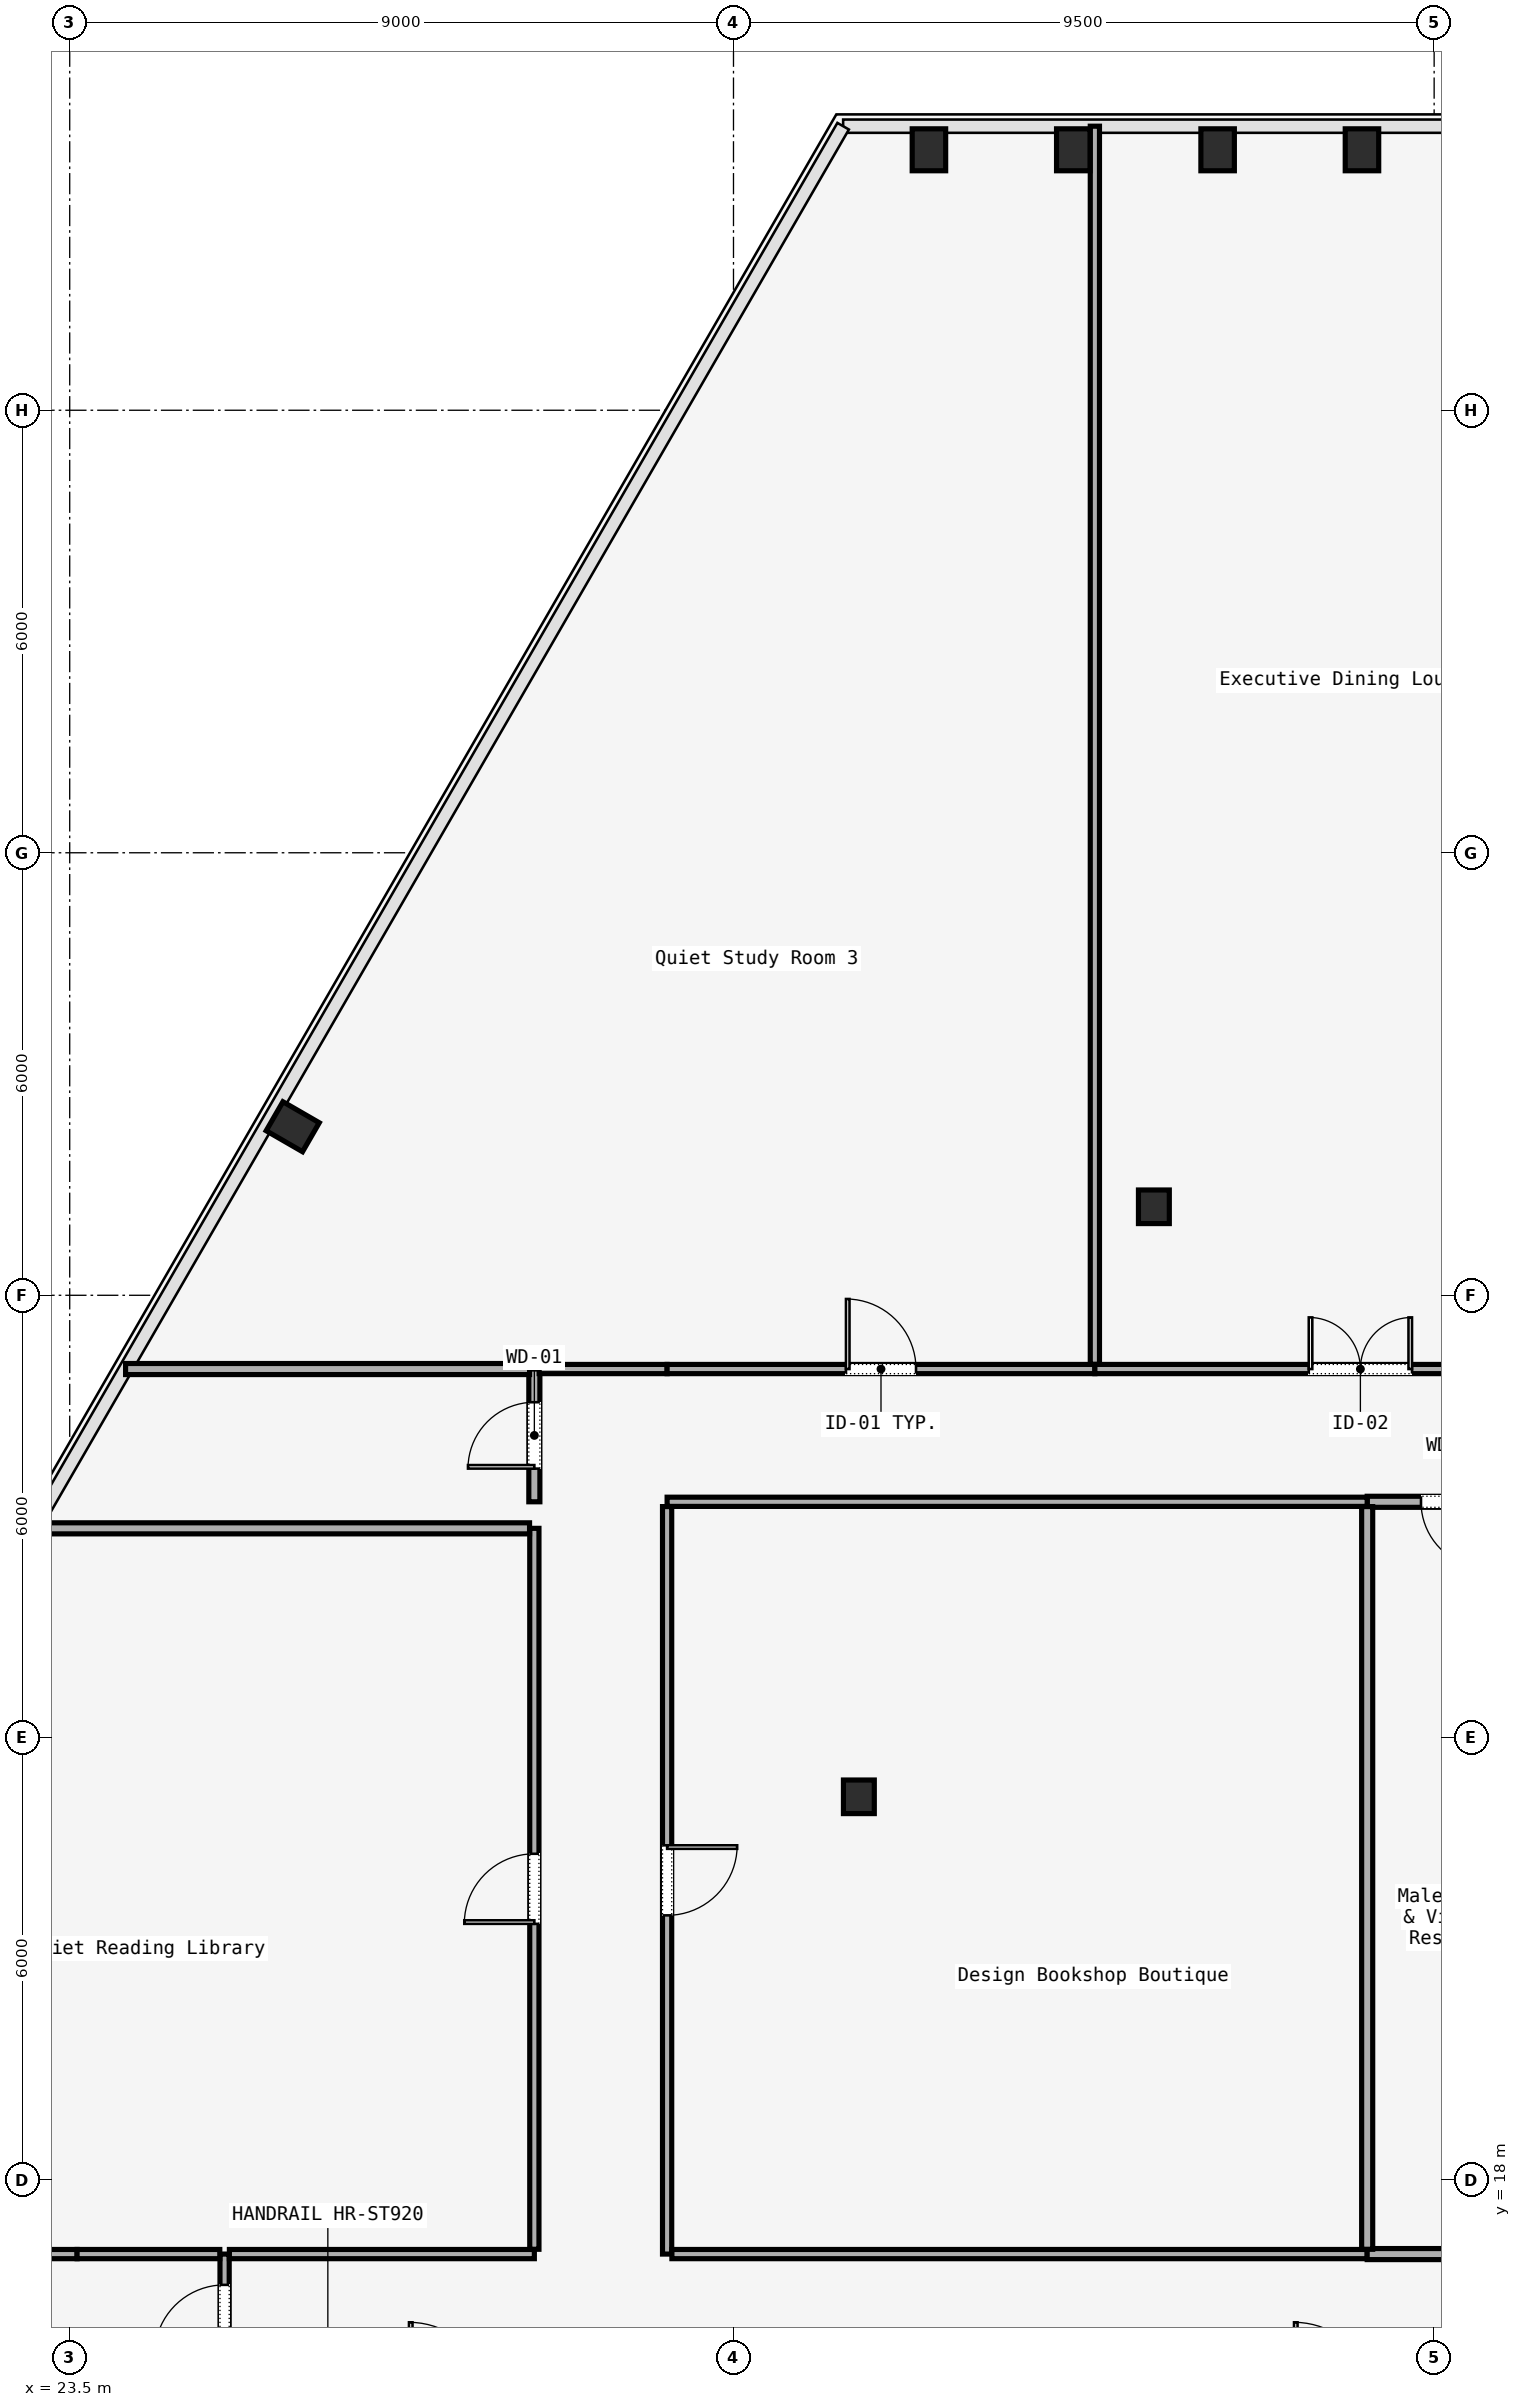
"""IFC4 building model, lengths in metres.
Left out: names, types, materials, properties, quantities, classifications, styles, units other than length and angle.
Written with IfcOpenShell. Run it as: python <this file> out.ifc"""

import sys

from ifc_helpers import new_model, si_unit, direction, frame, frame_2d, origin, origin_2d, place, context, subcontext, project, spatial, rectangle, i_section, extrude, element, fill, save


model = new_model("IFC4")
c1 = context("Model", 3, precision=1e-05, world=origin(), true_north=direction((0.0, 1.0)))
c2 = subcontext(c1, "Body", "Model", "MODEL_VIEW")
j1 = project(units=[si_unit("LENGTHUNIT", "METRE"), si_unit("PLANEANGLEUNIT", "RADIAN")], contexts=[c1])
p1 = place(None, origin())
s1 = spatial("IfcSite", under=j1, at=p1, CompositionType="ELEMENT")
p2 = place(p1, origin())
s2 = spatial("IfcBuilding", under=s1, at=p2, CompositionType="ELEMENT")
p3 = place(p2, frame((0.0, 0.0, 51.2)))
s3 = spatial("IfcBuildingStorey", under=s2, at=p3, CompositionType="ELEMENT", Elevation=51.2)
for number, where, z_axis, x_axis in (
    (1, (34.2, 23.2, 0.0), (0.0, 0.0, 1.0), (1.0, 0.0, 0.0)),
    (2, (38.2, 31.2, 0.0), (0.0, 0.0, 1.0), (1.0, 0.0, 0.0)),
):
    element("IfcColumn", number, at=place(p3, frame(where, z_axis=z_axis, x_axis=x_axis)), inside=s3, PredefinedType="COLUMN", context=c2, shape_type="SweptSolid", body=[
        extrude(i_section(OverallWidth=0.418, OverallDepth=0.456, WebThickness=0.042, FlangeThickness=0.067, FilletRadius=0.015, at=origin_2d()), origin(), (0.0, 0.0, 1.0), 3.58),
    ])
for number, where, z_axis, x_axis in (
    (3, (41.021, 45.531, 0.0), (0.0, 0.0, 1.0), (1.0, 0.0, 0.0)),
    (4, (39.064, 45.531, 0.0), (0.0, 0.0, 1.0), (1.0, 0.0, 0.0)),
    (5, (37.107, 45.531, 0.0), (0.0, 0.0, 1.0), (1.0, 0.0, 0.0)),
    (6, (35.15, 45.531, 0.0), (0.0, 0.0, 1.0), (1.0, 0.0, 0.0)),
    (7, (26.524, 32.285, 0.0), (0.0, 0.0, 1.0), (0.5, 0.866, 0.0)),
):
    element("IfcColumn", number, at=place(p3, frame(where, z_axis=z_axis, x_axis=x_axis)), inside=s3, PredefinedType="COLUMN", context=c2, shape_type="SweptSolid", body=[
        extrude(i_section(OverallWidth=0.454, OverallDepth=0.569, WebThickness=0.078, FlangeThickness=0.08, FilletRadius=0.015, at=origin_2d()), origin(), (0.0, 0.0, 1.0), 3.58),
    ])
p4 = place(p3, frame((25.6, 15.215, 0.0), z_axis=(0.0, 0.0, 1.0), x_axis=(0.0, 1.0, 0.0)))
e8 = element("IfcWall", 8, at=p4, inside=s3, PredefinedType="PARTITIONING", context=c2, shape_type="SweptSolid", body=[
    extrude(rectangle(XDim=1.785, YDim=0.125, at=frame_2d((0.893, 0.0))), origin(), (0.0, 0.0, 1.0), 2.933),
])
p5 = place(p4, frame((0.417, 0.0, 0.0)))
e9 = element("IfcOpeningElement", 9, at=p5, cuts=e8, PredefinedType="OPENING", context=c2, shape_type="SweptSolid", body=[
    extrude(rectangle(XDim=0.95, YDim=2.2, at=frame_2d((0.475, 1.1))), frame((0.0, 0.062, 0.0), z_axis=(0.0, -1.0, 0.0), x_axis=(1.0, 0.0, 0.0)), (0.0, 0.0, 1.0), 0.125),
])
p6 = place(p3, frame((25.665, 17.0, 0.0), z_axis=(0.0, 0.0, 1.0), x_axis=(1.0, 0.0, 0.0)))
e10 = element("IfcWall", 10, at=p6, inside=s3, PredefinedType="PARTITIONING", context=c2, shape_type="SweptSolid", body=[
    extrude(rectangle(XDim=4.135, YDim=0.125, at=frame_2d((2.067, 0.0))), origin(), (0.0, 0.0, 1.0), 2.933),
])
p7 = place(p3, frame((29.8, 17.065, 0.0), z_axis=(0.0, 0.0, 1.0), x_axis=(0.0, 1.0, 0.0)))
e11 = element("IfcWall", 11, at=p7, inside=s3, PredefinedType="PARTITIONING", context=c2, shape_type="SweptSolid", body=[
    extrude(rectangle(XDim=9.775, YDim=0.125, at=frame_2d((4.888, 0.0))), origin(), (0.0, 0.0, 1.0), 2.933),
])
p8 = place(p7, frame((4.413, 0.0, 0.0)))
e12 = element("IfcOpeningElement", 12, at=p8, cuts=e11, PredefinedType="OPENING", context=c2, shape_type="SweptSolid", body=[
    extrude(rectangle(XDim=0.95, YDim=2.2, at=frame_2d((0.475, 1.1))), frame((0.0, 0.062, 0.0), z_axis=(0.0, -1.0, 0.0), x_axis=(1.0, 0.0, 0.0)), (0.0, 0.0, 1.0), 0.125),
])
p9 = place(p3, frame((29.8, 27.2, 0.0), z_axis=(0.0, 0.0, 1.0), x_axis=(0.0, 1.0, 0.0)))
e13 = element("IfcWall", 13, at=p9, inside=s3, PredefinedType="PARTITIONING", context=c2, shape_type="SweptSolid", body=[
    extrude(rectangle(XDim=1.8, YDim=0.15, at=frame_2d((0.9, 0.0))), origin(), (0.0, 0.0, 1.0), 2.933),
])
p10 = place(p9, frame((0.45, 0.0, 0.0)))
e14 = element("IfcOpeningElement", 14, at=p10, cuts=e13, PredefinedType="OPENING", context=c2, shape_type="SweptSolid", body=[
    extrude(rectangle(XDim=0.9, YDim=2.15, at=frame_2d((0.45, 1.075))), frame((0.0, 0.075, 0.0), z_axis=(0.0, -1.0, 0.0), x_axis=(1.0, 0.0, 0.0)), (0.0, 0.0, 1.0), 0.15),
])
p11 = place(p3, frame((29.865, 29.0, 0.0), z_axis=(0.0, 0.0, 1.0), x_axis=(1.0, 0.0, 0.0)))
e15 = element("IfcWall", 15, at=p11, inside=s3, PredefinedType="PARTITIONING", context=c2, shape_type="SweptSolid", body=[
    extrude(rectangle(XDim=1.735, YDim=0.125, at=frame_2d((0.868, 0.0))), origin(), (0.0, 0.0, 1.0), 2.933),
])
p12 = place(p3, frame((31.6, 29.0, 0.0), z_axis=(0.0, 0.0, 1.0), x_axis=(1.0, 0.0, 0.0)))
e16 = element("IfcWall", 16, at=p12, inside=s3, PredefinedType="PARTITIONING", context=c2, shape_type="SweptSolid", body=[
    extrude(rectangle(XDim=5.8, YDim=0.125, at=frame_2d((2.9, 0.0))), origin(), (0.0, 0.0, 1.0), 2.933),
])
p13 = place(p12, frame((2.425, 0.0, 0.0)))
e17 = element("IfcOpeningElement", 17, at=p13, cuts=e16, PredefinedType="OPENING", context=c2, shape_type="SweptSolid", body=[
    extrude(rectangle(XDim=0.95, YDim=2.2, at=frame_2d((0.475, 1.1))), frame((0.0, 0.062, 0.0), z_axis=(0.0, -1.0, 0.0), x_axis=(1.0, 0.0, 0.0)), (0.0, 0.0, 1.0), 0.125),
])
p14 = place(p3, frame((37.4, 29.0, 0.0), z_axis=(0.0, 0.0, 1.0), x_axis=(1.0, 0.0, 0.0)))
e18 = element("IfcWall", 18, at=p14, inside=s3, PredefinedType="PARTITIONING", context=c2, shape_type="SweptSolid", body=[
    extrude(rectangle(XDim=7.2, YDim=0.125, at=frame_2d((3.6, 0.0))), origin(), (0.0, 0.0, 1.0), 2.933),
])
p15 = place(p14, frame((2.9, 0.0, 0.0)))
e19 = element("IfcOpeningElement", 19, at=p15, cuts=e18, PredefinedType="OPENING", context=c2, shape_type="SweptSolid", body=[
    extrude(rectangle(XDim=1.4, YDim=2.2, at=frame_2d((0.7, 1.1))), frame((0.0, 0.062, 0.0), z_axis=(0.0, -1.0, 0.0), x_axis=(1.0, 0.0, 0.0)), (0.0, 0.0, 1.0), 0.125),
])
p16 = place(p3, frame((43.451, 27.2, 0.0), z_axis=(0.0, 0.0, 1.0), x_axis=(-1.0, 0.0, 0.0)))
e20 = element("IfcWall", 20, at=p16, inside=s3, PredefinedType="PARTITIONING", context=c2, shape_type="SweptSolid", body=[
    extrude(rectangle(XDim=2.359, YDim=0.15, at=frame_2d((1.18, 0.0))), origin(), (0.0, 0.0, 1.0), 2.933),
])
p17 = place(p16, frame((0.73, 0.0, 0.0)))
e21 = element("IfcOpeningElement", 21, at=p17, cuts=e20, PredefinedType="OPENING", context=c2, shape_type="SweptSolid", body=[
    extrude(rectangle(XDim=0.9, YDim=2.15, at=frame_2d((0.45, 1.075))), frame((0.0, 0.075, 0.0), z_axis=(0.0, -1.0, 0.0), x_axis=(1.0, 0.0, 0.0)), (0.0, 0.0, 1.0), 0.15),
])
p18 = place(p3, frame((41.092, 27.2, 0.0), z_axis=(0.0, 0.0, 1.0), x_axis=(-1.0, 0.0, 0.0)))
e22 = element("IfcWall", 22, at=p18, inside=s3, PredefinedType="PARTITIONING", context=c2, shape_type="SweptSolid", body=[
    extrude(rectangle(XDim=9.492, YDim=0.125, at=frame_2d((4.746, 0.0))), origin(), (0.0, 0.0, 1.0), 2.933),
])
p19 = place(p3, frame((31.6, 27.135, 0.0), z_axis=(0.0, 0.0, 1.0), x_axis=(0.0, -1.0, 0.0)))
e23 = element("IfcWall", 23, at=p19, inside=s3, PredefinedType="PARTITIONING", context=c2, shape_type="SweptSolid", body=[
    extrude(rectangle(XDim=10.135, YDim=0.125, at=frame_2d((5.067, 0.0))), origin(), (0.0, 0.0, 1.0), 2.933),
])
p20 = place(p19, frame((4.593, 0.0, 0.0)))
e24 = element("IfcOpeningElement", 24, at=p20, cuts=e23, PredefinedType="OPENING", context=c2, shape_type="SweptSolid", body=[
    extrude(rectangle(XDim=0.95, YDim=2.2, at=frame_2d((0.475, 1.1))), frame((0.0, 0.062, 0.0), z_axis=(0.0, -1.0, 0.0), x_axis=(1.0, 0.0, 0.0)), (0.0, 0.0, 1.0), 0.125),
])
p21 = place(p3, frame((31.665, 17.0, 0.0), z_axis=(0.0, 0.0, 1.0), x_axis=(1.0, 0.0, 0.0)))
e25 = element("IfcWall", 25, at=p21, inside=s3, PredefinedType="PARTITIONING", context=c2, shape_type="SweptSolid", body=[
    extrude(rectangle(XDim=9.427, YDim=0.125, at=frame_2d((4.713, 0.0))), origin(), (0.0, 0.0, 1.0), 2.933),
])
p22 = place(p3, frame((41.092, 17.0, 0.0), z_axis=(0.0, 0.0, 1.0), x_axis=(1.0, 0.0, 0.0)))
e26 = element("IfcWall", 26, at=p22, inside=s3, PredefinedType="PARTITIONING", context=c2, shape_type="SweptSolid", body=[
    extrude(rectangle(XDim=2.359, YDim=0.15, at=frame_2d((1.18, 0.0))), origin(), (0.0, 0.0, 1.0), 2.933),
])
p23 = place(p3, frame((19.684, 17.0, 0.0), z_axis=(0.0, 0.0, 1.0), x_axis=(1.0, 0.0, 0.0)))
e27 = element("IfcWall", 27, at=p23, inside=s3, PredefinedType="PARTITIONING", context=c2, shape_type="SweptSolid", body=[
    extrude(rectangle(XDim=3.916, YDim=0.125, at=frame_2d((1.958, 0.0))), origin(), (0.0, 0.0, 1.0), 2.933),
])
p24 = place(p3, frame((23.6, 17.0, 0.0), z_axis=(0.0, 0.0, 1.0), x_axis=(1.0, 0.0, 0.0)))
e28 = element("IfcWall", 28, at=p24, inside=s3, PredefinedType="PARTITIONING", context=c2, shape_type="SweptSolid", body=[
    extrude(rectangle(XDim=1.935, YDim=0.125, at=frame_2d((0.967, 0.0))), origin(), (0.0, 0.0, 1.0), 2.933),
])
p25 = place(p3, frame((23.01, 26.84, 0.0), z_axis=(0.0, 0.0, 1.0), x_axis=(1.0, 0.0, 0.0)))
e29 = element("IfcWall", 29, at=p25, inside=s3, PredefinedType="PARTITIONING", context=c2, shape_type="SweptSolid", body=[
    extrude(rectangle(XDim=6.725, YDim=0.15, at=frame_2d((3.362, 0.0))), origin(), (0.0, 0.0, 1.0), 2.933),
])
p26 = place(p3, frame((41.092, 27.135, 0.0), z_axis=(0.0, 0.0, 1.0), x_axis=(0.0, -1.0, 0.0)))
e30 = element("IfcWall", 30, at=p26, inside=s3, PredefinedType="PARTITIONING", context=c2, shape_type="SweptSolid", body=[
    extrude(rectangle(XDim=10.07, YDim=0.15, at=frame_2d((5.035, 0.0))), origin(), (0.0, 0.0, 1.0), 2.933),
])
p27 = place(p3, frame((24.258, 29.0, 0.0), z_axis=(0.0, 0.0, 1.0), x_axis=(1.0, 0.0, 0.0)))
e31 = element("IfcWall", 31, at=p27, inside=s3, PredefinedType="PARTITIONING", context=c2, shape_type="SweptSolid", body=[
    extrude(rectangle(XDim=5.478, YDim=0.15, at=frame_2d((2.739, 0.0))), origin(), (0.0, 0.0, 1.0), 2.933),
])
p28 = place(p3, frame((37.4, 45.851, 0.0), z_axis=(0.0, 0.0, 1.0), x_axis=(0.0, -1.0, 0.0)))
e32 = element("IfcWall", 32, at=p28, inside=s3, PredefinedType="PARTITIONING", context=c2, shape_type="SweptSolid", body=[
    extrude(rectangle(XDim=16.786, YDim=0.125, at=frame_2d((8.393, 0.0))), origin(), (0.0, 0.0, 1.0), 2.933),
])
p29 = place(p5, origin())
e33 = element("IfcDoor", 33, at=p29, inside=s3, OperationType="SINGLE_SWING_LEFT", PredefinedType="DOOR", context=c2, shape_type="SweptSolid", body=[
    extrude(rectangle(XDim=0.95, YDim=2.2, at=frame_2d((0.475, 1.1))), frame((0.0, 0.025, 0.0), z_axis=(0.0, -1.0, 0.0), x_axis=(1.0, 0.0, 0.0)), (0.0, 0.0, 1.0), 0.05),
])
fill(e9, e33)
p30 = place(p8, origin())
e34 = element("IfcDoor", 34, at=p30, inside=s3, OperationType="SINGLE_SWING_LEFT", PredefinedType="DOOR", context=c2, shape_type="SweptSolid", body=[
    extrude(rectangle(XDim=0.95, YDim=2.2, at=frame_2d((0.475, 1.1))), frame((0.0, 0.025, 0.0), z_axis=(0.0, -1.0, 0.0), x_axis=(1.0, 0.0, 0.0)), (0.0, 0.0, 1.0), 0.05),
])
fill(e12, e34)
p31 = place(p20, origin())
e35 = element("IfcDoor", 35, at=p31, inside=s3, OperationType="SINGLE_SWING_RIGHT", PredefinedType="DOOR", context=c2, shape_type="SweptSolid", body=[
    extrude(rectangle(XDim=0.95, YDim=2.2, at=frame_2d((0.475, 1.1))), frame((0.0, 0.025, 0.0), z_axis=(0.0, -1.0, 0.0), x_axis=(1.0, 0.0, 0.0)), (0.0, 0.0, 1.0), 0.05),
])
fill(e24, e35)
p32 = place(p17, origin())
e36 = element("IfcDoor", 36, at=p32, inside=s3, OperationType="SINGLE_SWING_LEFT", PredefinedType="DOOR", context=c2, shape_type="SweptSolid", body=[
    extrude(rectangle(XDim=0.9, YDim=2.15, at=frame_2d((0.45, 1.075))), frame((0.0, 0.025, 0.0), z_axis=(0.0, -1.0, 0.0), x_axis=(1.0, 0.0, 0.0)), (0.0, 0.0, 1.0), 0.05),
])
fill(e21, e36)
p33 = place(p10, origin())
e37 = element("IfcDoor", 37, at=p33, inside=s3, OperationType="SINGLE_SWING_RIGHT", PredefinedType="DOOR", context=c2, shape_type="SweptSolid", body=[
    extrude(rectangle(XDim=0.9, YDim=2.15, at=frame_2d((0.45, 1.075))), frame((0.0, 0.025, 0.0), z_axis=(0.0, -1.0, 0.0), x_axis=(1.0, 0.0, 0.0)), (0.0, 0.0, 1.0), 0.05),
])
fill(e14, e37)
p34 = place(p13, origin())
e38 = element("IfcDoor", 38, at=p34, inside=s3, OperationType="SINGLE_SWING_RIGHT", PredefinedType="DOOR", context=c2, shape_type="SweptSolid", body=[
    extrude(rectangle(XDim=0.95, YDim=2.2, at=frame_2d((0.475, 1.1))), frame((0.0, 0.025, 0.0), z_axis=(0.0, -1.0, 0.0), x_axis=(1.0, 0.0, 0.0)), (0.0, 0.0, 1.0), 0.05),
])
fill(e17, e38)
p35 = place(p15, origin())
e39 = element("IfcDoor", 39, at=p35, inside=s3, OperationType="SINGLE_SWING_RIGHT", PredefinedType="DOOR", context=c2, shape_type="SweptSolid", body=[
    extrude(rectangle(XDim=1.4, YDim=2.2, at=frame_2d((0.7, 1.1))), frame((0.0, 0.025, 0.0), z_axis=(0.0, -1.0, 0.0), x_axis=(1.0, 0.0, 0.0)), (0.0, 0.0, 1.0), 0.05),
])
fill(e19, e39)
save(model, sys.argv[1])
